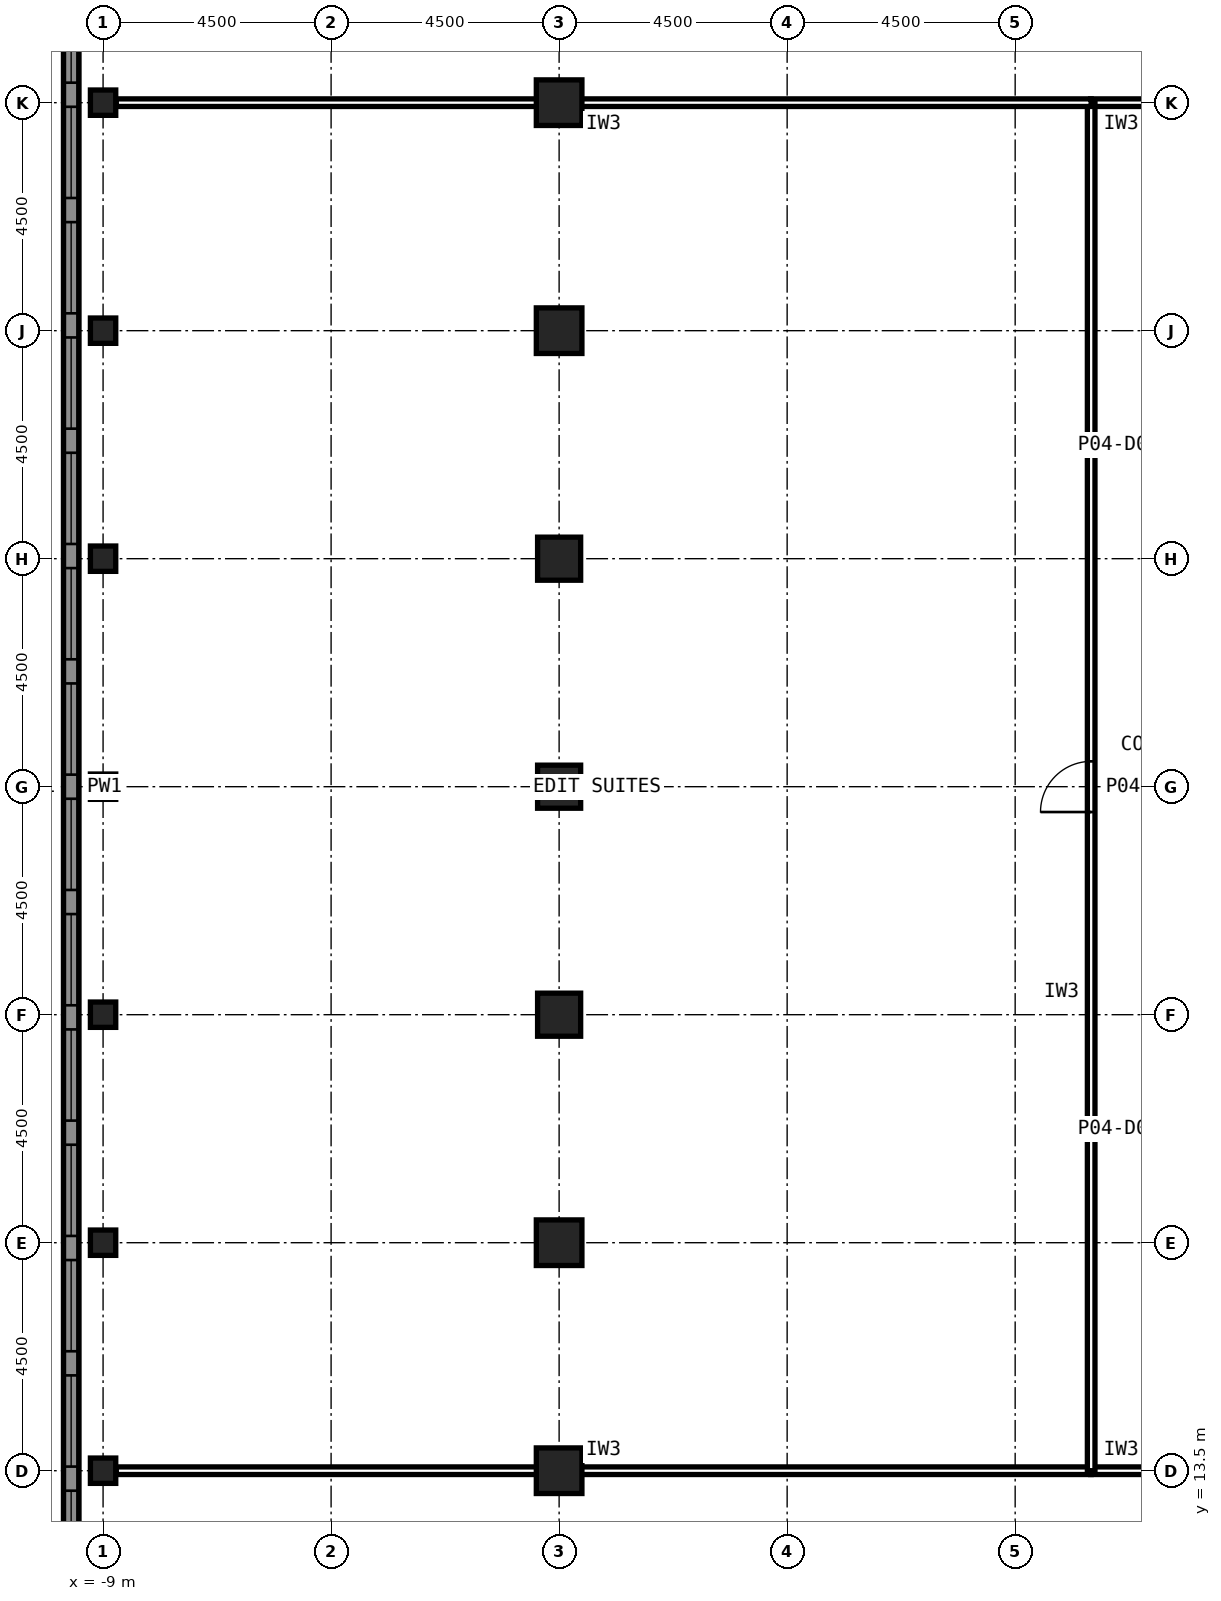
"""IFC4 building model, lengths in metres.
Left out: names, types, materials, properties, quantities, classifications, styles, units other than length and angle.
Written with IfcOpenShell. Run it as: python <this file> out.ifc"""

import sys

from ifc_helpers import new_model, si_unit, direction, frame, frame_2d, origin, origin_2d, place, context, subcontext, project, spatial, rectangle, hollow_rectangle, extrude, element, fill, save


model = new_model("IFC4")
c1 = context("Model", 3, precision=1e-05, world=origin(), true_north=direction((0.0, 1.0)))
c2 = subcontext(c1, "Body", "Model", "MODEL_VIEW")
j1 = project(units=[si_unit("LENGTHUNIT", "METRE"), si_unit("PLANEANGLEUNIT", "RADIAN")], contexts=[c1])
p1 = place(None, origin())
s1 = spatial("IfcSite", under=j1, at=p1, CompositionType="ELEMENT")
p2 = place(p1, origin())
s2 = spatial("IfcBuilding", under=s1, at=p2, CompositionType="ELEMENT")
p3 = place(p2, frame((0.0, 0.0, 18.0)))
s3 = spatial("IfcBuildingStorey", under=s2, at=p3, CompositionType="ELEMENT", Elevation=18.0)
for number, where, z_axis, x_axis in (
    (1, (0.0, 40.5, 0.0), (0.0, 0.0, 1.0), (1.0, 0.0, 0.0)),
    (2, (0.0, 36.0, 0.0), (0.0, 0.0, 1.0), (1.0, 0.0, 0.0)),
):
    element("IfcColumn", number, at=place(p3, frame(where, z_axis=z_axis, x_axis=x_axis)), inside=s3, PredefinedType="COLUMN", context=c2, shape_type="SweptSolid", body=[
        extrude(hollow_rectangle(XDim=0.9, YDim=0.9, WallThickness=0.063, at=origin_2d()), origin(), (0.0, 0.0, 1.0), 5.0),
    ])
for number, where, z_axis, x_axis in (
    (3, (0.0, 31.5, 0.0), (0.0, 0.0, 1.0), (1.0, 0.0, 0.0)),
    (4, (0.0, 27.0, 0.0), (0.0, 0.0, 1.0), (1.0, 0.0, 0.0)),
    (5, (0.0, 22.5, 0.0), (0.0, 0.0, 1.0), (1.0, 0.0, 0.0)),
):
    element("IfcColumn", number, at=place(p3, frame(where, z_axis=z_axis, x_axis=x_axis)), inside=s3, PredefinedType="COLUMN", context=c2, shape_type="SweptSolid", body=[
        extrude(hollow_rectangle(XDim=0.85, YDim=0.85, WallThickness=0.05, at=origin_2d()), origin(), (0.0, 0.0, 1.0), 5.0),
    ])
for number, where, z_axis, x_axis in (
    (6, (0.0, 18.0, 0.0), (0.0, 0.0, 1.0), (1.0, 0.0, 0.0)),
    (7, (0.0, 13.5, 0.0), (0.0, 0.0, 1.0), (1.0, 0.0, 0.0)),
):
    element("IfcColumn", number, at=place(p3, frame(where, z_axis=z_axis, x_axis=x_axis)), inside=s3, PredefinedType="COLUMN", context=c2, shape_type="SweptSolid", body=[
        extrude(hollow_rectangle(XDim=0.9, YDim=0.9, WallThickness=0.063, at=origin_2d()), origin(), (0.0, 0.0, 1.0), 5.0),
    ])
for number, where, z_axis, x_axis in (
    (8, (-9.0, 13.5, 0.0), (0.0, 0.0, 1.0), (1.0, 0.0, 0.0)),
    (9, (-9.0, 18.0, 0.0), (0.0, 0.0, 1.0), (1.0, 0.0, 0.0)),
    (10, (-9.0, 22.5, 0.0), (0.0, 0.0, 1.0), (1.0, 0.0, 0.0)),
    (11, (-9.0, 27.0, 0.0), (0.0, 0.0, 1.0), (1.0, 0.0, 0.0)),
    (12, (-9.0, 31.5, 0.0), (0.0, 0.0, 1.0), (1.0, 0.0, 0.0)),
    (13, (-9.0, 36.0, 0.0), (0.0, 0.0, 1.0), (1.0, 0.0, 0.0)),
    (14, (-9.0, 40.5, 0.0), (0.0, 0.0, 1.0), (1.0, 0.0, 0.0)),
):
    element("IfcColumn", number, at=place(p3, frame(where, z_axis=z_axis, x_axis=x_axis)), inside=s3, PredefinedType="COLUMN", context=c2, shape_type="SweptSolid", body=[
        extrude(hollow_rectangle(XDim=0.5, YDim=0.5, WallThickness=0.022, at=origin_2d()), origin(), (0.0, 0.0, 1.0), 5.0),
    ])
p4 = place(p3, frame((-9.63, 4.239, 0.0), z_axis=(0.0, 0.0, 1.0), x_axis=(0.0, 1.0, 0.0)))
e15 = element("IfcWall", 15, at=p4, inside=s3, PredefinedType="SOLIDWALL", context=c2, shape_type="SweptSolid", body=[
    extrude(rectangle(XDim=45.522, YDim=0.3, at=frame_2d((22.761, 0.0))), origin(), (0.0, 0.0, 1.0), 5.0),
])
p5 = place(p4, frame((2.514, 0.0, 1.1)))
e16 = element("IfcOpeningElement", 16, at=p5, cuts=e15, PredefinedType="OPENING", context=c2, shape_type="SweptSolid", body=[
    extrude(rectangle(XDim=1.8, YDim=1.2, at=frame_2d((0.9, 0.6))), frame((0.0, 0.16, 0.0), z_axis=(0.0, -1.0, 0.0), x_axis=(1.0, 0.0, 0.0)), (0.0, 0.0, 1.0), 0.32),
])
p6 = place(p4, frame((4.79, 0.0, 1.1)))
e17 = element("IfcOpeningElement", 17, at=p6, cuts=e15, PredefinedType="OPENING", context=c2, shape_type="SweptSolid", body=[
    extrude(rectangle(XDim=1.8, YDim=1.2, at=frame_2d((0.9, 0.6))), frame((0.0, 0.16, 0.0), z_axis=(0.0, -1.0, 0.0), x_axis=(1.0, 0.0, 0.0)), (0.0, 0.0, 1.0), 0.32),
])
p7 = place(p4, frame((7.066, 0.0, 1.1)))
e18 = element("IfcOpeningElement", 18, at=p7, cuts=e15, PredefinedType="OPENING", context=c2, shape_type="SweptSolid", body=[
    extrude(rectangle(XDim=1.8, YDim=1.2, at=frame_2d((0.9, 0.6))), frame((0.0, 0.16, 0.0), z_axis=(0.0, -1.0, 0.0), x_axis=(1.0, 0.0, 0.0)), (0.0, 0.0, 1.0), 0.32),
])
p8 = place(p4, frame((9.343, 0.0, 1.1)))
e19 = element("IfcOpeningElement", 19, at=p8, cuts=e15, PredefinedType="OPENING", context=c2, shape_type="SweptSolid", body=[
    extrude(rectangle(XDim=1.8, YDim=1.2, at=frame_2d((0.9, 0.6))), frame((0.0, 0.16, 0.0), z_axis=(0.0, -1.0, 0.0), x_axis=(1.0, 0.0, 0.0)), (0.0, 0.0, 1.0), 0.32),
])
p9 = place(p4, frame((11.619, 0.0, 1.1)))
e20 = element("IfcOpeningElement", 20, at=p9, cuts=e15, PredefinedType="OPENING", context=c2, shape_type="SweptSolid", body=[
    extrude(rectangle(XDim=1.8, YDim=1.2, at=frame_2d((0.9, 0.6))), frame((0.0, 0.16, 0.0), z_axis=(0.0, -1.0, 0.0), x_axis=(1.0, 0.0, 0.0)), (0.0, 0.0, 1.0), 0.32),
])
p10 = place(p4, frame((13.895, 0.0, 1.1)))
e21 = element("IfcOpeningElement", 21, at=p10, cuts=e15, PredefinedType="OPENING", context=c2, shape_type="SweptSolid", body=[
    extrude(rectangle(XDim=1.8, YDim=1.2, at=frame_2d((0.9, 0.6))), frame((0.0, 0.16, 0.0), z_axis=(0.0, -1.0, 0.0), x_axis=(1.0, 0.0, 0.0)), (0.0, 0.0, 1.0), 0.32),
])
p11 = place(p4, frame((16.171, 0.0, 1.1)))
e22 = element("IfcOpeningElement", 22, at=p11, cuts=e15, PredefinedType="OPENING", context=c2, shape_type="SweptSolid", body=[
    extrude(rectangle(XDim=1.8, YDim=1.2, at=frame_2d((0.9, 0.6))), frame((0.0, 0.16, 0.0), z_axis=(0.0, -1.0, 0.0), x_axis=(1.0, 0.0, 0.0)), (0.0, 0.0, 1.0), 0.32),
])
p12 = place(p4, frame((18.447, 0.0, 1.1)))
e23 = element("IfcOpeningElement", 23, at=p12, cuts=e15, PredefinedType="OPENING", context=c2, shape_type="SweptSolid", body=[
    extrude(rectangle(XDim=1.8, YDim=1.2, at=frame_2d((0.9, 0.6))), frame((0.0, 0.16, 0.0), z_axis=(0.0, -1.0, 0.0), x_axis=(1.0, 0.0, 0.0)), (0.0, 0.0, 1.0), 0.32),
])
p13 = place(p4, frame((20.723, 0.0, 1.1)))
e24 = element("IfcOpeningElement", 24, at=p13, cuts=e15, PredefinedType="OPENING", context=c2, shape_type="SweptSolid", body=[
    extrude(rectangle(XDim=1.8, YDim=1.2, at=frame_2d((0.9, 0.6))), frame((0.0, 0.16, 0.0), z_axis=(0.0, -1.0, 0.0), x_axis=(1.0, 0.0, 0.0)), (0.0, 0.0, 1.0), 0.32),
])
p14 = place(p4, frame((22.999, 0.0, 1.1)))
e25 = element("IfcOpeningElement", 25, at=p14, cuts=e15, PredefinedType="OPENING", context=c2, shape_type="SweptSolid", body=[
    extrude(rectangle(XDim=1.8, YDim=1.2, at=frame_2d((0.9, 0.6))), frame((0.0, 0.16, 0.0), z_axis=(0.0, -1.0, 0.0), x_axis=(1.0, 0.0, 0.0)), (0.0, 0.0, 1.0), 0.32),
])
p15 = place(p4, frame((25.275, 0.0, 1.1)))
e26 = element("IfcOpeningElement", 26, at=p15, cuts=e15, PredefinedType="OPENING", context=c2, shape_type="SweptSolid", body=[
    extrude(rectangle(XDim=1.8, YDim=1.2, at=frame_2d((0.9, 0.6))), frame((0.0, 0.16, 0.0), z_axis=(0.0, -1.0, 0.0), x_axis=(1.0, 0.0, 0.0)), (0.0, 0.0, 1.0), 0.32),
])
p16 = place(p4, frame((27.551, 0.0, 1.1)))
e27 = element("IfcOpeningElement", 27, at=p16, cuts=e15, PredefinedType="OPENING", context=c2, shape_type="SweptSolid", body=[
    extrude(rectangle(XDim=1.8, YDim=1.2, at=frame_2d((0.9, 0.6))), frame((0.0, 0.16, 0.0), z_axis=(0.0, -1.0, 0.0), x_axis=(1.0, 0.0, 0.0)), (0.0, 0.0, 1.0), 0.32),
])
p17 = place(p4, frame((29.827, 0.0, 1.1)))
e28 = element("IfcOpeningElement", 28, at=p17, cuts=e15, PredefinedType="OPENING", context=c2, shape_type="SweptSolid", body=[
    extrude(rectangle(XDim=1.8, YDim=1.2, at=frame_2d((0.9, 0.6))), frame((0.0, 0.16, 0.0), z_axis=(0.0, -1.0, 0.0), x_axis=(1.0, 0.0, 0.0)), (0.0, 0.0, 1.0), 0.32),
])
p18 = place(p4, frame((32.104, 0.0, 1.1)))
e29 = element("IfcOpeningElement", 29, at=p18, cuts=e15, PredefinedType="OPENING", context=c2, shape_type="SweptSolid", body=[
    extrude(rectangle(XDim=1.8, YDim=1.2, at=frame_2d((0.9, 0.6))), frame((0.0, 0.16, 0.0), z_axis=(0.0, -1.0, 0.0), x_axis=(1.0, 0.0, 0.0)), (0.0, 0.0, 1.0), 0.32),
])
p19 = place(p4, frame((34.38, 0.0, 1.1)))
e30 = element("IfcOpeningElement", 30, at=p19, cuts=e15, PredefinedType="OPENING", context=c2, shape_type="SweptSolid", body=[
    extrude(rectangle(XDim=1.8, YDim=1.2, at=frame_2d((0.9, 0.6))), frame((0.0, 0.16, 0.0), z_axis=(0.0, -1.0, 0.0), x_axis=(1.0, 0.0, 0.0)), (0.0, 0.0, 1.0), 0.32),
])
p20 = place(p4, frame((36.656, 0.0, 1.1)))
e31 = element("IfcOpeningElement", 31, at=p20, cuts=e15, PredefinedType="OPENING", context=c2, shape_type="SweptSolid", body=[
    extrude(rectangle(XDim=1.8, YDim=1.2, at=frame_2d((0.9, 0.6))), frame((0.0, 0.16, 0.0), z_axis=(0.0, -1.0, 0.0), x_axis=(1.0, 0.0, 0.0)), (0.0, 0.0, 1.0), 0.32),
])
p21 = place(p4, frame((38.932, 0.0, 1.1)))
e32 = element("IfcOpeningElement", 32, at=p21, cuts=e15, PredefinedType="OPENING", context=c2, shape_type="SweptSolid", body=[
    extrude(rectangle(XDim=1.8, YDim=1.2, at=frame_2d((0.9, 0.6))), frame((0.0, 0.16, 0.0), z_axis=(0.0, -1.0, 0.0), x_axis=(1.0, 0.0, 0.0)), (0.0, 0.0, 1.0), 0.32),
])
p22 = place(p4, frame((41.208, 0.0, 1.1)))
e33 = element("IfcOpeningElement", 33, at=p22, cuts=e15, PredefinedType="OPENING", context=c2, shape_type="SweptSolid", body=[
    extrude(rectangle(XDim=1.8, YDim=1.2, at=frame_2d((0.9, 0.6))), frame((0.0, 0.16, 0.0), z_axis=(0.0, -1.0, 0.0), x_axis=(1.0, 0.0, 0.0)), (0.0, 0.0, 1.0), 0.32),
])
for number, where, z_axis, x_axis in (
    (34, (10.49, 13.5, 0.0), (0.0, 0.0, 1.0), (1.0, 0.0, 0.0)),
    (35, (11.7, 40.5, 0.0), (0.0, 0.0, 1.0), (-1.0, 0.0, 0.0)),
):
    element("IfcWall", number, at=place(p3, frame(where, z_axis=z_axis, x_axis=x_axis)), inside=s3, PredefinedType="PARTITIONING", context=c2, shape_type="SweptSolid", body=[
        extrude(rectangle(XDim=1.21, YDim=0.15, at=frame_2d((0.605, 0.0))), origin(), (0.0, 0.0, 1.0), 3.682),
    ])
p23 = place(p3, frame((-8.74, 13.5, 0.0), z_axis=(0.0, 0.0, 1.0), x_axis=(1.0, 0.0, 0.0)))
e36 = element("IfcWall", 36, at=p23, inside=s3, PredefinedType="PARTITIONING", context=c2, shape_type="SweptSolid", body=[
    extrude(rectangle(XDim=19.24, YDim=0.15, at=frame_2d((9.62, 0.0))), origin(), (0.0, 0.0, 1.0), 3.682),
])
p24 = place(p3, frame((10.5, 13.5, 0.0), z_axis=(0.0, 0.0, 1.0), x_axis=(0.0, 1.0, 0.0)))
e37 = element("IfcWall", 37, at=p24, inside=s3, PredefinedType="PARTITIONING", context=c2, shape_type="SweptSolid", body=[
    extrude(rectangle(XDim=27.0, YDim=0.15, at=frame_2d((13.5, 0.0))), origin(), (0.0, 0.0, 1.0), 4.8),
])
p25 = place(p24, frame((13.0, 0.0, 0.0)))
e38 = element("IfcOpeningElement", 38, at=p25, cuts=e37, PredefinedType="OPENING", context=c2, shape_type="SweptSolid", body=[
    extrude(rectangle(XDim=1.0, YDim=2.1, at=frame_2d((0.5, 1.05))), frame((0.0, 0.085, 0.0), z_axis=(0.0, -1.0, 0.0), x_axis=(1.0, 0.0, 0.0)), (0.0, 0.0, 1.0), 0.17),
])
p26 = place(p3, frame((10.5, 40.5, 0.0), z_axis=(0.0, 0.0, 1.0), x_axis=(-1.0, 0.0, 0.0)))
e39 = element("IfcWall", 39, at=p26, inside=s3, PredefinedType="PARTITIONING", context=c2, shape_type="SweptSolid", body=[
    extrude(rectangle(XDim=19.24, YDim=0.15, at=frame_2d((9.62, 0.0))), origin(), (0.0, 0.0, 1.0), 3.682),
])
p27 = place(p3, frame((-9.63, 4.239, 5.0), z_axis=(0.0, 0.0, 1.0), x_axis=(0.0, 1.0, 0.0)))
e40 = element("IfcWall", 40, at=p27, inside=s3, PredefinedType="PARAPET", context=c2, shape_type="SweptSolid", body=[
    extrude(rectangle(XDim=45.522, YDim=0.3, at=frame_2d((22.761, 0.0))), origin(), (0.0, 0.0, 1.0), 1.1),
])
p28 = place(p7, origin())
e41 = element("IfcWindow", 41, at=p28, inside=s3, PartitioningType="SINGLE_PANEL", PredefinedType="WINDOW", context=c2, shape_type="SweptSolid", body=[
    extrude(rectangle(XDim=1.8, YDim=1.2, at=frame_2d((0.9, 0.6))), frame((0.0, 0.03, 0.0), z_axis=(0.0, -1.0, 0.0), x_axis=(1.0, 0.0, 0.0)), (0.0, 0.0, 1.0), 0.06),
])
fill(e18, e41)
p29 = place(p8, origin())
e42 = element("IfcWindow", 42, at=p29, inside=s3, PartitioningType="SINGLE_PANEL", PredefinedType="WINDOW", context=c2, shape_type="SweptSolid", body=[
    extrude(rectangle(XDim=1.8, YDim=1.2, at=frame_2d((0.9, 0.6))), frame((0.0, 0.03, 0.0), z_axis=(0.0, -1.0, 0.0), x_axis=(1.0, 0.0, 0.0)), (0.0, 0.0, 1.0), 0.06),
])
fill(e19, e42)
p30 = place(p9, origin())
e43 = element("IfcWindow", 43, at=p30, inside=s3, PartitioningType="SINGLE_PANEL", PredefinedType="WINDOW", context=c2, shape_type="SweptSolid", body=[
    extrude(rectangle(XDim=1.8, YDim=1.2, at=frame_2d((0.9, 0.6))), frame((0.0, 0.03, 0.0), z_axis=(0.0, -1.0, 0.0), x_axis=(1.0, 0.0, 0.0)), (0.0, 0.0, 1.0), 0.06),
])
fill(e20, e43)
p31 = place(p10, origin())
e44 = element("IfcWindow", 44, at=p31, inside=s3, PartitioningType="SINGLE_PANEL", PredefinedType="WINDOW", context=c2, shape_type="SweptSolid", body=[
    extrude(rectangle(XDim=1.8, YDim=1.2, at=frame_2d((0.9, 0.6))), frame((0.0, 0.03, 0.0), z_axis=(0.0, -1.0, 0.0), x_axis=(1.0, 0.0, 0.0)), (0.0, 0.0, 1.0), 0.06),
])
fill(e21, e44)
p32 = place(p11, origin())
e45 = element("IfcWindow", 45, at=p32, inside=s3, PartitioningType="SINGLE_PANEL", PredefinedType="WINDOW", context=c2, shape_type="SweptSolid", body=[
    extrude(rectangle(XDim=1.8, YDim=1.2, at=frame_2d((0.9, 0.6))), frame((0.0, 0.03, 0.0), z_axis=(0.0, -1.0, 0.0), x_axis=(1.0, 0.0, 0.0)), (0.0, 0.0, 1.0), 0.06),
])
fill(e22, e45)
p33 = place(p12, origin())
e46 = element("IfcWindow", 46, at=p33, inside=s3, PartitioningType="SINGLE_PANEL", PredefinedType="WINDOW", context=c2, shape_type="SweptSolid", body=[
    extrude(rectangle(XDim=1.8, YDim=1.2, at=frame_2d((0.9, 0.6))), frame((0.0, 0.03, 0.0), z_axis=(0.0, -1.0, 0.0), x_axis=(1.0, 0.0, 0.0)), (0.0, 0.0, 1.0), 0.06),
])
fill(e23, e46)
p34 = place(p13, origin())
e47 = element("IfcWindow", 47, at=p34, inside=s3, PartitioningType="SINGLE_PANEL", PredefinedType="WINDOW", context=c2, shape_type="SweptSolid", body=[
    extrude(rectangle(XDim=1.8, YDim=1.2, at=frame_2d((0.9, 0.6))), frame((0.0, 0.03, 0.0), z_axis=(0.0, -1.0, 0.0), x_axis=(1.0, 0.0, 0.0)), (0.0, 0.0, 1.0), 0.06),
])
fill(e24, e47)
p35 = place(p14, origin())
e48 = element("IfcWindow", 48, at=p35, inside=s3, PartitioningType="SINGLE_PANEL", PredefinedType="WINDOW", context=c2, shape_type="SweptSolid", body=[
    extrude(rectangle(XDim=1.8, YDim=1.2, at=frame_2d((0.9, 0.6))), frame((0.0, 0.03, 0.0), z_axis=(0.0, -1.0, 0.0), x_axis=(1.0, 0.0, 0.0)), (0.0, 0.0, 1.0), 0.06),
])
fill(e25, e48)
p36 = place(p15, origin())
e49 = element("IfcWindow", 49, at=p36, inside=s3, PartitioningType="SINGLE_PANEL", PredefinedType="WINDOW", context=c2, shape_type="SweptSolid", body=[
    extrude(rectangle(XDim=1.8, YDim=1.2, at=frame_2d((0.9, 0.6))), frame((0.0, 0.03, 0.0), z_axis=(0.0, -1.0, 0.0), x_axis=(1.0, 0.0, 0.0)), (0.0, 0.0, 1.0), 0.06),
])
fill(e26, e49)
p37 = place(p16, origin())
e50 = element("IfcWindow", 50, at=p37, inside=s3, PartitioningType="SINGLE_PANEL", PredefinedType="WINDOW", context=c2, shape_type="SweptSolid", body=[
    extrude(rectangle(XDim=1.8, YDim=1.2, at=frame_2d((0.9, 0.6))), frame((0.0, 0.03, 0.0), z_axis=(0.0, -1.0, 0.0), x_axis=(1.0, 0.0, 0.0)), (0.0, 0.0, 1.0), 0.06),
])
fill(e27, e50)
p38 = place(p17, origin())
e51 = element("IfcWindow", 51, at=p38, inside=s3, PartitioningType="SINGLE_PANEL", PredefinedType="WINDOW", context=c2, shape_type="SweptSolid", body=[
    extrude(rectangle(XDim=1.8, YDim=1.2, at=frame_2d((0.9, 0.6))), frame((0.0, 0.03, 0.0), z_axis=(0.0, -1.0, 0.0), x_axis=(1.0, 0.0, 0.0)), (0.0, 0.0, 1.0), 0.06),
])
fill(e28, e51)
p39 = place(p18, origin())
e52 = element("IfcWindow", 52, at=p39, inside=s3, PartitioningType="SINGLE_PANEL", PredefinedType="WINDOW", context=c2, shape_type="SweptSolid", body=[
    extrude(rectangle(XDim=1.8, YDim=1.2, at=frame_2d((0.9, 0.6))), frame((0.0, 0.03, 0.0), z_axis=(0.0, -1.0, 0.0), x_axis=(1.0, 0.0, 0.0)), (0.0, 0.0, 1.0), 0.06),
])
fill(e29, e52)
p40 = place(p19, origin())
e53 = element("IfcWindow", 53, at=p40, inside=s3, PartitioningType="SINGLE_PANEL", PredefinedType="WINDOW", context=c2, shape_type="SweptSolid", body=[
    extrude(rectangle(XDim=1.8, YDim=1.2, at=frame_2d((0.9, 0.6))), frame((0.0, 0.03, 0.0), z_axis=(0.0, -1.0, 0.0), x_axis=(1.0, 0.0, 0.0)), (0.0, 0.0, 1.0), 0.06),
])
fill(e30, e53)
p41 = place(p20, origin())
e54 = element("IfcWindow", 54, at=p41, inside=s3, PartitioningType="SINGLE_PANEL", PredefinedType="WINDOW", context=c2, shape_type="SweptSolid", body=[
    extrude(rectangle(XDim=1.8, YDim=1.2, at=frame_2d((0.9, 0.6))), frame((0.0, 0.03, 0.0), z_axis=(0.0, -1.0, 0.0), x_axis=(1.0, 0.0, 0.0)), (0.0, 0.0, 1.0), 0.06),
])
fill(e31, e54)
p42 = place(p25, origin())
e55 = element("IfcDoor", 55, at=p42, inside=s3, OperationType="SINGLE_SWING_LEFT", PredefinedType="DOOR", context=c2, shape_type="SweptSolid", body=[
    extrude(rectangle(XDim=1.0, YDim=2.1, at=frame_2d((0.5, 1.05))), frame((0.0, 0.025, 0.0), z_axis=(0.0, -1.0, 0.0), x_axis=(1.0, 0.0, 0.0)), (0.0, 0.0, 1.0), 0.05),
])
fill(e38, e55)
save(model, sys.argv[1])
